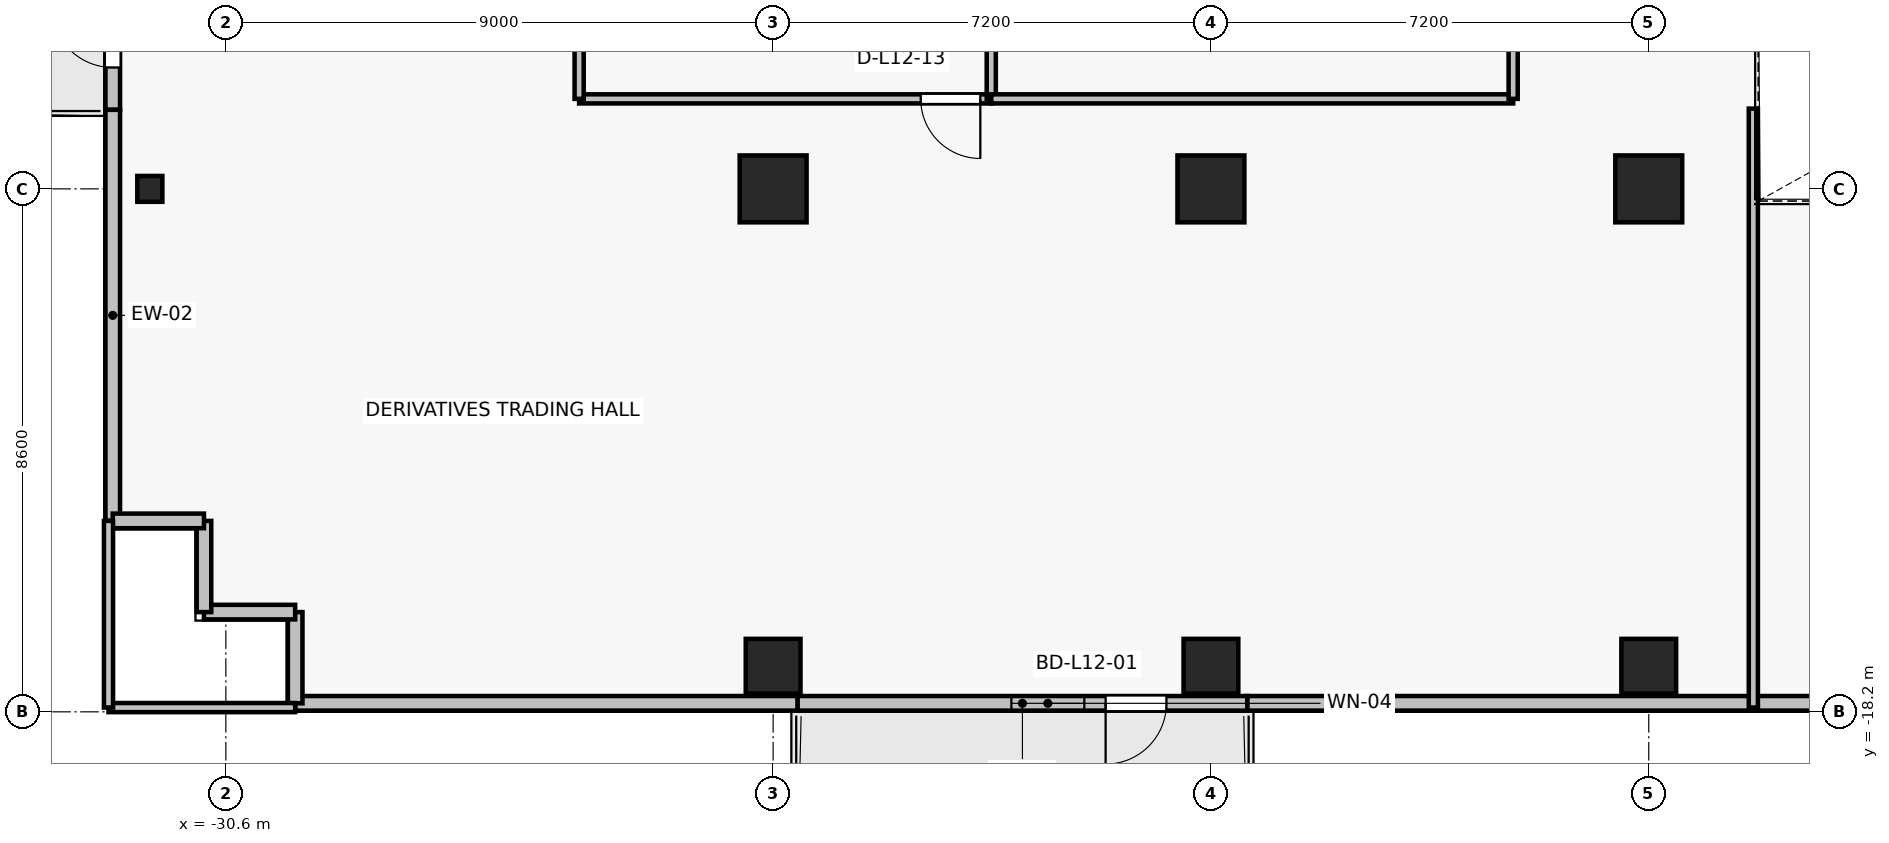
"""IFC4 building model, lengths in metres.
Left out: names, types, materials, properties, quantities, classifications, styles, units other than length and angle.
Written with IfcOpenShell. Run it as: python <this file> out.ifc"""

import sys

from ifc_helpers import new_model, si_unit, direction, frame, frame_2d, origin, origin_2d, place, context, subcontext, project, spatial, rectangle, i_section, extrude, source, transform, mapped, element, fill, save


model = new_model("IFC4")
c1 = context("Model", 3, precision=1e-05, world=origin(), true_north=direction((0.0, 1.0)))
c2 = subcontext(c1, "Body", "Model", "MODEL_VIEW")
j1 = project(units=[si_unit("LENGTHUNIT", "METRE"), si_unit("PLANEANGLEUNIT", "RADIAN")], contexts=[c1])
p1 = place(None, origin())
s1 = spatial("IfcSite", under=j1, at=p1, CompositionType="ELEMENT")
p2 = place(p1, origin())
s2 = spatial("IfcBuilding", under=s1, at=p2, CompositionType="ELEMENT")
p3 = place(p2, frame((0.0, 0.0, 47.2)))
s3 = spatial("IfcBuildingStorey", under=s2, at=p3, CompositionType="ELEMENT", Elevation=47.2)
for number, where, z_axis, x_axis in (
    (1, (-14.4, -9.6, 0.0), (0.0, 0.0, 1.0), (1.0, 0.0, 0.0)),
    (2, (-7.2, -9.6, 0.0), (0.0, 0.0, 1.0), (1.0, 0.0, 0.0)),
    (3, (-21.6, -9.6, 0.0), (0.0, 0.0, 1.0), (1.0, 0.0, 0.0)),
):
    element("IfcColumn", number, at=place(p3, frame(where, z_axis=z_axis, x_axis=x_axis)), inside=s3, PredefinedType="COLUMN", context=c2, shape_type="SweptSolid", body=[
        extrude(rectangle(XDim=1.1, YDim=1.1, at=origin_2d()), origin(), (0.0, 0.0, 1.0), 3.3),
    ])
for number, where, z_axis, x_axis in (
    (4, (-14.4, -17.45, 0.0), (0.0, 0.0, 1.0), (1.0, 0.0, 0.0)),
    (5, (-7.2, -17.45, 0.0), (0.0, 0.0, 1.0), (1.0, 0.0, 0.0)),
    (6, (-21.6, -17.45, 0.0), (0.0, 0.0, 1.0), (1.0, 0.0, 0.0)),
):
    element("IfcColumn", number, at=place(p3, frame(where, z_axis=z_axis, x_axis=x_axis)), inside=s3, PredefinedType="COLUMN", context=c2, shape_type="SweptSolid", body=[
        extrude(rectangle(XDim=0.9, YDim=0.9, at=origin_2d()), origin(), (0.0, 0.0, 1.0), 3.3),
    ])
p4 = place(p3, frame((-31.85, -9.6, 0.0), z_axis=(0.0, 0.0, 1.0), x_axis=(1.0, 0.0, 0.0)))
e7 = element("IfcColumn", 7, at=p4, inside=s3, PredefinedType="COLUMN", context=c2, shape_type="SweptSolid", body=[
    extrude(i_section(OverallWidth=0.412, OverallDepth=0.425, WebThickness=0.026, FlangeThickness=0.039, FilletRadius=0.015, at=origin_2d()), origin(), (0.0, 0.0, 1.0), 3.3),
])
p5 = place(p3, frame((-13.8, -18.06, 0.0), z_axis=(0.0, 0.0, 1.0), x_axis=(-1.0, 0.0, 0.0)))
e8 = element("IfcWall", 8, at=p5, inside=s3, PredefinedType="SOLIDWALL", context=c2, shape_type="SweptSolid", body=[
    extrude(rectangle(XDim=7.4, YDim=0.24, at=frame_2d((3.7, 0.0))), origin(), (0.0, 0.0, 1.0), 2.665),
])
p6 = place(p5, frame((1.332, 0.0, 0.0)))
e9 = element("IfcOpeningElement", 9, at=p6, cuts=e8, PredefinedType="OPENING", context=c2, shape_type="SweptSolid", body=[
    extrude(rectangle(XDim=1.0, YDim=2.2, at=frame_2d((0.5, 1.1))), frame((0.0, 0.13, 0.0), z_axis=(0.0, -1.0, 0.0), x_axis=(1.0, 0.0, 0.0)), (0.0, 0.0, 1.0), 0.26),
])
p7 = place(p5, frame((2.682, 0.0, 0.85)))
e10 = element("IfcOpeningElement", 10, at=p7, cuts=e8, PredefinedType="OPENING", context=c2, shape_type="SweptSolid", body=[
    extrude(rectangle(XDim=1.2, YDim=1.5, at=frame_2d((0.6, 0.75))), frame((0.0, 0.13, 0.0), z_axis=(0.0, -1.0, 0.0), x_axis=(1.0, 0.0, 0.0)), (0.0, 0.0, 1.0), 0.26),
])
p8 = place(p3, frame((-32.46, -8.3, 0.0), z_axis=(0.0, 0.0, 1.0), x_axis=(0.0, 1.0, 0.0)))
e11 = element("IfcWall", 11, at=p8, inside=s3, PredefinedType="SOLIDWALL", context=c2, shape_type="SweptSolid", body=[
    extrude(rectangle(XDim=5.8, YDim=0.24, at=frame_2d((2.9, 0.0))), origin(), (0.0, 0.0, 1.0), 3.075),
])
p9 = place(p8, frame((0.696, 0.0, 0.0)))
e12 = element("IfcOpeningElement", 12, at=p9, cuts=e11, PredefinedType="OPENING", context=c2, shape_type="SweptSolid", body=[
    extrude(rectangle(XDim=1.0, YDim=2.2, at=frame_2d((0.5, 1.1))), frame((0.0, 0.13, 0.0), z_axis=(0.0, -1.0, 0.0), x_axis=(1.0, 0.0, 0.0)), (0.0, 0.0, 1.0), 0.26),
])
p10 = place(p8, frame((2.046, 0.0, 0.85)))
e13 = element("IfcOpeningElement", 13, at=p10, cuts=e11, PredefinedType="OPENING", context=c2, shape_type="SweptSolid", body=[
    extrude(rectangle(XDim=1.5, YDim=1.6, at=frame_2d((0.75, 0.8))), frame((0.0, 0.13, 0.0), z_axis=(0.0, -1.0, 0.0), x_axis=(1.0, 0.0, 0.0)), (0.0, 0.0, 1.0), 0.26),
])
p11 = place(p3, frame((-32.46, -8.3, 0.0), z_axis=(0.0, 0.0, 1.0), x_axis=(0.0, -1.0, 0.0)))
e14 = element("IfcWall", 14, at=p11, inside=s3, PredefinedType="SOLIDWALL", context=c2, shape_type="SweptSolid", body=[
    extrude(rectangle(XDim=6.76, YDim=0.24, at=frame_2d((3.38, 0.0))), origin(), (0.0, 0.0, 1.0), 3.075),
])
p12 = place(p3, frame((-13.8, -18.06, 0.0), z_axis=(0.0, 0.0, 1.0), x_axis=(1.0, 0.0, 0.0)))
e15 = element("IfcWall", 15, at=p12, inside=s3, PredefinedType="SOLIDWALL", context=c2, shape_type="SweptSolid", body=[
    extrude(rectangle(XDim=10.46, YDim=0.24, at=frame_2d((5.23, 0.0))), origin(), (0.0, 0.0, 1.0), 2.665),
])
p13 = place(p3, frame((-29.46, -18.06, 0.0), z_axis=(0.0, 0.0, 1.0), x_axis=(1.0, 0.0, 0.0)))
e16 = element("IfcWall", 16, at=p13, inside=s3, PredefinedType="SOLIDWALL", context=c2, shape_type="SweptSolid", body=[
    extrude(rectangle(XDim=8.26, YDim=0.24, at=frame_2d((4.13, 0.0))), origin(), (0.0, 0.0, 1.0), 3.075),
])
for number, where, z_axis, x_axis in (
    (17, (-29.46, -16.56, 0.0), (0.0, 0.0, 1.0), (0.0, -1.0, 0.0)),
    (18, (-30.96, -16.56, 0.0), (0.0, 0.0, 1.0), (1.0, 0.0, 0.0)),
    (19, (-30.96, -15.06, 0.0), (0.0, 0.0, 1.0), (0.0, -1.0, 0.0)),
    (20, (-32.46, -15.06, 0.0), (0.0, 0.0, 1.0), (1.0, 0.0, 0.0)),
):
    element("IfcWall", number, at=place(p3, frame(where, z_axis=z_axis, x_axis=x_axis)), inside=s3, PredefinedType="SOLIDWALL", context=c2, shape_type="SweptSolid", body=[
        extrude(rectangle(XDim=1.5, YDim=0.24, at=frame_2d((0.75, 0.0))), origin(), (0.0, 0.0, 1.0), 3.075),
    ])
p14 = place(p3, frame((-18.012, -8.12, 0.0), z_axis=(0.0, 0.0, 1.0), x_axis=(-1.0, 0.0, 0.0)))
e21 = element("IfcWall", 21, at=p14, inside=s3, PredefinedType="PARTITIONING", context=c2, shape_type="SweptSolid", body=[
    extrude(rectangle(XDim=6.778, YDim=0.15, at=frame_2d((3.389, 0.0))), origin(), (0.0, 0.0, 1.0), 2.465),
])
p15 = place(p14, frame((0.18, 0.0, 0.0)))
e22 = element("IfcOpeningElement", 22, at=p15, cuts=e21, PredefinedType="OPENING", context=c2, shape_type="SweptSolid", body=[
    extrude(rectangle(XDim=0.98, YDim=2.15, at=frame_2d((0.49, 1.075))), frame((0.0, 0.085, 0.0), z_axis=(0.0, -1.0, 0.0), x_axis=(1.0, 0.0, 0.0)), (0.0, 0.0, 1.0), 0.17),
])
for number, where, z_axis, x_axis in (
    (23, (-24.79, -8.12, 0.0), (0.0, 0.0, 1.0), (0.0, 1.0, 0.0)),
    (24, (-18.012, -3.83, 0.0), (0.0, 0.0, 1.0), (0.0, -1.0, 0.0)),
):
    element("IfcWall", number, at=place(p3, frame(where, z_axis=z_axis, x_axis=x_axis)), inside=s3, PredefinedType="PARTITIONING", context=c2, shape_type="SweptSolid", body=[
        extrude(rectangle(XDim=4.29, YDim=0.15, at=frame_2d((2.145, 0.0))), origin(), (0.0, 0.0, 1.0), 2.565),
    ])
p16 = place(p3, frame((-9.43, -8.12, 0.0), z_axis=(0.0, 0.0, 1.0), x_axis=(-1.0, 0.0, 0.0)))
e25 = element("IfcWall", 25, at=p16, inside=s3, PredefinedType="PARTITIONING", context=c2, shape_type="SweptSolid", body=[
    extrude(rectangle(XDim=8.583, YDim=0.15, at=frame_2d((4.291, 0.0))), origin(), (0.0, 0.0, 1.0), 2.465),
])
p17 = place(p3, frame((-9.43, -3.83, 0.0), z_axis=(0.0, 0.0, 1.0), x_axis=(0.0, -1.0, 0.0)))
e26 = element("IfcWall", 26, at=p17, inside=s3, PredefinedType="PARTITIONING", context=c2, shape_type="SweptSolid", body=[
    extrude(rectangle(XDim=4.29, YDim=0.15, at=frame_2d((2.145, 0.0))), origin(), (0.0, 0.0, 1.0), 2.565),
])
p18 = place(p3, frame((-29.46, -18.13, 0.0), z_axis=(0.0, 0.0, 1.0), x_axis=(-1.0, 0.0, 0.0)))
e27 = element("IfcWall", 27, at=p18, inside=s3, PredefinedType="PARTITIONING", context=c2, shape_type="SweptSolid", body=[
    extrude(rectangle(XDim=3.07, YDim=0.15, at=frame_2d((1.535, 0.0))), origin(), (0.0, 0.0, 1.0), 2.665),
])
p19 = place(p3, frame((-32.53, -18.13, 0.0), z_axis=(0.0, 0.0, 1.0), x_axis=(0.0, 1.0, 0.0)))
e28 = element("IfcWall", 28, at=p19, inside=s3, PredefinedType="PARTITIONING", context=c2, shape_type="SweptSolid", body=[
    extrude(rectangle(XDim=3.07, YDim=0.15, at=frame_2d((1.535, 0.0))), origin(), (0.0, 0.0, 1.0), 3.075),
])
p20 = place(p3, frame((-5.48, -8.28, 0.0), z_axis=(0.0, 0.0, 1.0), x_axis=(0.0, -1.0, 0.0)))
e29 = element("IfcWall", 29, at=p20, inside=s3, PredefinedType="PARTITIONING", context=c2, shape_type="SweptSolid", body=[
    extrude(rectangle(XDim=9.85, YDim=0.15, at=frame_2d((4.925, 0.0))), origin(), (0.0, 0.0, 1.0), 2.465),
])
m1 = source(origin(), c2, "Body", "SweptSolid", [
    extrude(rectangle(XDim=1.0, YDim=2.2, at=frame_2d((0.5, 1.1))), frame((0.0, 0.025, 0.0), z_axis=(0.0, -1.0, 0.0), x_axis=(1.0, 0.0, 0.0)), (0.0, 0.0, 1.0), 0.05),
])
p21 = place(p6, origin())
e30 = element("IfcDoor", 30, at=p21, inside=s3, OperationType="SINGLE_SWING_RIGHT", PredefinedType="DOOR", context=c2, shape_type="MappedRepresentation", body=[
    mapped(m1, transform((0.0, 0.0, 0.0), x_axis=(1.0, 0.0, 0.0), y_axis=(0.0, 1.0, 0.0), z_axis=(0.0, 0.0, 1.0), scale=1.0)),
])
fill(e9, e30)
m2 = source(origin(), c2, "Body", "SweptSolid", [
    extrude(rectangle(XDim=1.2, YDim=1.5, at=frame_2d((0.6, 0.75))), frame((0.0, 0.03, 0.0), z_axis=(0.0, -1.0, 0.0), x_axis=(1.0, 0.0, 0.0)), (0.0, 0.0, 1.0), 0.06),
])
p22 = place(p7, origin())
e31 = element("IfcWindow", 31, at=p22, inside=s3, PartitioningType="SINGLE_PANEL", PredefinedType="WINDOW", context=c2, shape_type="MappedRepresentation", body=[
    mapped(m2, transform((0.0, 0.0, 0.0), x_axis=(1.0, 0.0, 0.0), y_axis=(0.0, 1.0, 0.0), z_axis=(0.0, 0.0, 1.0), scale=1.0)),
])
fill(e10, e31)
p23 = place(p9, origin())
e32 = element("IfcDoor", 32, at=p23, inside=s3, OperationType="SINGLE_SWING_RIGHT", PredefinedType="DOOR", context=c2, shape_type="MappedRepresentation", body=[
    mapped(m1, transform((0.0, 0.0, 0.0), x_axis=(1.0, 0.0, 0.0), y_axis=(0.0, 1.0, 0.0), z_axis=(0.0, 0.0, 1.0), scale=1.0)),
])
fill(e12, e32)
m3 = source(origin(), c2, "Body", "SweptSolid", [
    extrude(rectangle(XDim=0.98, YDim=2.15, at=frame_2d((0.49, 1.075))), frame((0.0, 0.025, 0.0), z_axis=(0.0, -1.0, 0.0), x_axis=(1.0, 0.0, 0.0)), (0.0, 0.0, 1.0), 0.05),
])
p24 = place(p15, origin())
e33 = element("IfcDoor", 33, at=p24, inside=s3, OperationType="SINGLE_SWING_LEFT", PredefinedType="DOOR", context=c2, shape_type="MappedRepresentation", body=[
    mapped(m3, transform((0.0, 0.0, 0.0), x_axis=(1.0, 0.0, 0.0), y_axis=(0.0, 1.0, 0.0), z_axis=(0.0, 0.0, 1.0), scale=1.0)),
])
fill(e22, e33)
save(model, sys.argv[1])
